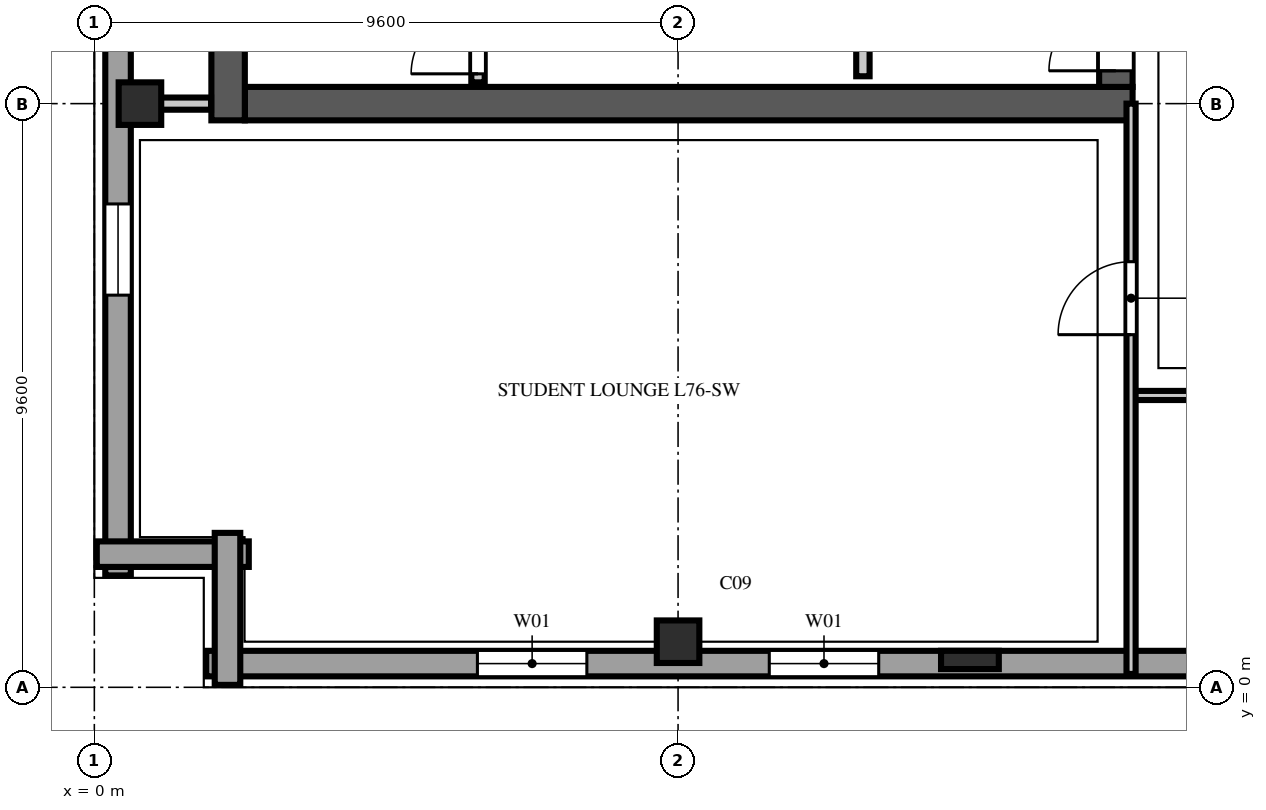
"""IFC4 building model, lengths in metres.
Left out: names, types, materials, properties, quantities, classifications, styles, units other than length and angle.
Written with IfcOpenShell. Run it as: python <this file> out.ifc"""

import sys

from ifc_helpers import new_model, si_unit, direction, frame, frame_2d, origin, origin_2d, place, context, subcontext, project, spatial, rectangle, extrude, element, fill, save


model = new_model("IFC4")
c1 = context("Model", 3, precision=1e-05, world=origin(), true_north=direction((0.0, 1.0)))
c2 = subcontext(c1, "Body", "Model", "MODEL_VIEW")
j1 = project(units=[si_unit("LENGTHUNIT", "METRE"), si_unit("PLANEANGLEUNIT", "RADIAN")], contexts=[c1])
p1 = place(None, origin())
s1 = spatial("IfcSite", under=j1, at=p1, CompositionType="ELEMENT")
p2 = place(p1, origin())
s2 = spatial("IfcBuilding", under=s1, at=p2, CompositionType="ELEMENT")
p3 = place(p2, frame((0.0, 0.0, 300.0)))
s3 = spatial("IfcBuildingStorey", under=s2, at=p3, CompositionType="ELEMENT", Elevation=300.0)
p4 = place(p3, frame((2.475, 9.6, 0.0), z_axis=(0.0, 0.0, 1.0), x_axis=(1.0, 0.0, 0.0)))
e1 = element("IfcWall", 1, at=p4, inside=s3, PredefinedType="SHEAR", context=c2, shape_type="SweptSolid", body=[
    extrude(rectangle(XDim=14.6, YDim=0.55, at=frame_2d((7.3, 0.0))), origin(), (0.0, 0.0, 1.0), 3.54),
])
p5 = place(p3, frame((2.2, 9.325, 0.0), z_axis=(0.0, 0.0, 1.0), x_axis=(0.0, 1.0, 0.0)))
e2 = element("IfcWall", 2, at=p5, inside=s3, PredefinedType="SHEAR", context=c2, shape_type="SweptSolid", body=[
    extrude(rectangle(XDim=38.95, YDim=0.55, at=frame_2d((19.475, 0.0))), origin(), (0.0, 0.0, 1.0), 3.54),
])
p6 = place(p3, frame((16.8, 9.875, 0.0), z_axis=(0.0, 0.0, 1.0), x_axis=(0.0, 1.0, 0.0)))
e3 = element("IfcWall", 3, at=p6, inside=s3, PredefinedType="SHEAR", context=c2, shape_type="SweptSolid", body=[
    extrude(rectangle(XDim=12.525, YDim=0.55, at=frame_2d((6.262, 0.0))), origin(), (0.0, 0.0, 1.0), 3.54),
])
p7 = place(p6, frame((0.265, 0.0, 0.0)))
e4 = element("IfcOpeningElement", 4, at=p7, cuts=e3, PredefinedType="OPENING", context=c2, shape_type="SweptSolid", body=[
    extrude(rectangle(XDim=1.1, YDim=2.2, at=frame_2d((0.55, 1.1))), frame((0.0, 0.287, 0.0), z_axis=(0.0, -1.0, 0.0), x_axis=(1.0, 0.0, 0.0)), (0.0, 0.0, 1.0), 0.574),
])
for number, where, z_axis, x_axis in (
    (5, (0.75, 9.6, 0.0), (0.0, 0.0, 1.0), (1.0, 0.0, 0.0)),
    (6, (9.6, 0.75, 0.0), (0.0, 0.0, 1.0), (1.0, 0.0, 0.0)),
):
    element("IfcColumn", number, at=place(p3, frame(where, z_axis=z_axis, x_axis=x_axis)), inside=s3, PredefinedType="COLUMN", context=c2, shape_type="SweptSolid", body=[
        extrude(rectangle(XDim=0.7, YDim=0.7, at=origin_2d()), origin(), (0.0, 0.0, 1.0), 3.8),
    ])
p8 = place(p3, frame((14.4, 0.45, 0.0), z_axis=(0.0, 0.0, 1.0), x_axis=(1.0, 0.0, 0.0)))
e7 = element("IfcColumn", 7, at=p8, inside=s3, PredefinedType="PILASTER", context=c2, shape_type="SweptSolid", body=[
    extrude(rectangle(XDim=0.95, YDim=0.3, at=origin_2d()), origin(), (0.0, 0.0, 1.0), 3.8),
])
p9 = place(p3, frame((1.84, 0.39, 0.0), z_axis=(0.0, 0.0, 1.0), x_axis=(1.0, 0.0, 0.0)))
e8 = element("IfcWall", 8, at=p9, inside=s3, PredefinedType="SOLIDWALL", context=c2, shape_type="SweptSolid", body=[
    extrude(rectangle(XDim=44.32, YDim=0.42, at=frame_2d((22.16, 0.0))), origin(), (0.0, 0.0, 1.0), 3.54),
])
p10 = place(p9, frame((4.46, 0.0, 0.85)))
e9 = element("IfcOpeningElement", 9, at=p10, cuts=e8, PredefinedType="OPENING", context=c2, shape_type="SweptSolid", body=[
    extrude(rectangle(XDim=1.8, YDim=1.85, at=frame_2d((0.9, 0.925))), frame((0.0, 0.222, 0.0), z_axis=(0.0, -1.0, 0.0), x_axis=(1.0, 0.0, 0.0)), (0.0, 0.0, 1.0), 0.444),
])
p11 = place(p9, frame((9.26, 0.0, 0.85)))
e10 = element("IfcOpeningElement", 10, at=p11, cuts=e8, PredefinedType="OPENING", context=c2, shape_type="SweptSolid", body=[
    extrude(rectangle(XDim=1.8, YDim=1.85, at=frame_2d((0.9, 0.925))), frame((0.0, 0.222, 0.0), z_axis=(0.0, -1.0, 0.0), x_axis=(1.0, 0.0, 0.0)), (0.0, 0.0, 1.0), 0.444),
])
p12 = place(p9, frame((18.86, 0.0, 0.85)))
e11 = element("IfcOpeningElement", 11, at=p12, cuts=e8, PredefinedType="OPENING", context=c2, shape_type="SweptSolid", body=[
    extrude(rectangle(XDim=1.8, YDim=1.85, at=frame_2d((0.9, 0.925))), frame((0.0, 0.222, 0.0), z_axis=(0.0, -1.0, 0.0), x_axis=(1.0, 0.0, 0.0)), (0.0, 0.0, 1.0), 0.444),
])
p13 = place(p9, frame((28.46, 0.0, 0.85)))
e12 = element("IfcOpeningElement", 12, at=p13, cuts=e8, PredefinedType="OPENING", context=c2, shape_type="SweptSolid", body=[
    extrude(rectangle(XDim=1.8, YDim=1.85, at=frame_2d((0.9, 0.925))), frame((0.0, 0.222, 0.0), z_axis=(0.0, -1.0, 0.0), x_axis=(1.0, 0.0, 0.0)), (0.0, 0.0, 1.0), 0.444),
])
p14 = place(p9, frame((33.26, 0.0, 0.85)))
e13 = element("IfcOpeningElement", 13, at=p14, cuts=e8, PredefinedType="OPENING", context=c2, shape_type="SweptSolid", body=[
    extrude(rectangle(XDim=1.8, YDim=1.85, at=frame_2d((0.9, 0.925))), frame((0.0, 0.222, 0.0), z_axis=(0.0, -1.0, 0.0), x_axis=(1.0, 0.0, 0.0)), (0.0, 0.0, 1.0), 0.444),
])
p15 = place(p9, frame((38.06, 0.0, 0.85)))
e14 = element("IfcOpeningElement", 14, at=p15, cuts=e8, PredefinedType="OPENING", context=c2, shape_type="SweptSolid", body=[
    extrude(rectangle(XDim=1.8, YDim=1.85, at=frame_2d((0.9, 0.925))), frame((0.0, 0.222, 0.0), z_axis=(0.0, -1.0, 0.0), x_axis=(1.0, 0.0, 0.0)), (0.0, 0.0, 1.0), 0.444),
])
p16 = place(p3, frame((0.39, 46.16, 0.0), z_axis=(0.0, 0.0, 1.0), x_axis=(0.0, -1.0, 0.0)))
e15 = element("IfcWall", 15, at=p16, inside=s3, PredefinedType="SOLIDWALL", context=c2, shape_type="SweptSolid", body=[
    extrude(rectangle(XDim=44.32, YDim=0.42, at=frame_2d((22.16, 0.0))), origin(), (0.0, 0.0, 1.0), 3.54),
])
p17 = place(p16, frame((4.885, 0.0, 0.9)))
e16 = element("IfcOpeningElement", 16, at=p17, cuts=e15, PredefinedType="OPENING", context=c2, shape_type="SweptSolid", body=[
    extrude(rectangle(XDim=0.95, YDim=1.85, at=frame_2d((0.475, 0.925))), frame((0.0, 0.222, 0.0), z_axis=(0.0, -1.0, 0.0), x_axis=(1.0, 0.0, 0.0)), (0.0, 0.0, 1.0), 0.444),
])
p18 = place(p16, frame((9.41, 0.0, 0.9)))
e17 = element("IfcOpeningElement", 17, at=p18, cuts=e15, PredefinedType="OPENING", context=c2, shape_type="SweptSolid", body=[
    extrude(rectangle(XDim=1.5, YDim=1.85, at=frame_2d((0.75, 0.925))), frame((0.0, 0.222, 0.0), z_axis=(0.0, -1.0, 0.0), x_axis=(1.0, 0.0, 0.0)), (0.0, 0.0, 1.0), 0.444),
])
p19 = place(p16, frame((14.485, 0.0, 0.9)))
e18 = element("IfcOpeningElement", 18, at=p19, cuts=e15, PredefinedType="OPENING", context=c2, shape_type="SweptSolid", body=[
    extrude(rectangle(XDim=0.95, YDim=1.85, at=frame_2d((0.475, 0.925))), frame((0.0, 0.222, 0.0), z_axis=(0.0, -1.0, 0.0), x_axis=(1.0, 0.0, 0.0)), (0.0, 0.0, 1.0), 0.444),
])
p20 = place(p16, frame((19.01, 0.0, 0.9)))
e19 = element("IfcOpeningElement", 19, at=p20, cuts=e15, PredefinedType="OPENING", context=c2, shape_type="SweptSolid", body=[
    extrude(rectangle(XDim=1.5, YDim=1.85, at=frame_2d((0.75, 0.925))), frame((0.0, 0.222, 0.0), z_axis=(0.0, -1.0, 0.0), x_axis=(1.0, 0.0, 0.0)), (0.0, 0.0, 1.0), 0.444),
])
p21 = place(p16, frame((24.085, 0.0, 0.9)))
e20 = element("IfcOpeningElement", 20, at=p21, cuts=e15, PredefinedType="OPENING", context=c2, shape_type="SweptSolid", body=[
    extrude(rectangle(XDim=0.95, YDim=1.85, at=frame_2d((0.475, 0.925))), frame((0.0, 0.222, 0.0), z_axis=(0.0, -1.0, 0.0), x_axis=(1.0, 0.0, 0.0)), (0.0, 0.0, 1.0), 0.444),
])
p22 = place(p16, frame((28.61, 0.0, 0.9)))
e21 = element("IfcOpeningElement", 21, at=p22, cuts=e15, PredefinedType="OPENING", context=c2, shape_type="SweptSolid", body=[
    extrude(rectangle(XDim=1.5, YDim=1.85, at=frame_2d((0.75, 0.925))), frame((0.0, 0.222, 0.0), z_axis=(0.0, -1.0, 0.0), x_axis=(1.0, 0.0, 0.0)), (0.0, 0.0, 1.0), 0.444),
])
p23 = place(p16, frame((33.685, 0.0, 0.9)))
e22 = element("IfcOpeningElement", 22, at=p23, cuts=e15, PredefinedType="OPENING", context=c2, shape_type="SweptSolid", body=[
    extrude(rectangle(XDim=0.95, YDim=1.85, at=frame_2d((0.475, 0.925))), frame((0.0, 0.222, 0.0), z_axis=(0.0, -1.0, 0.0), x_axis=(1.0, 0.0, 0.0)), (0.0, 0.0, 1.0), 0.444),
])
p24 = place(p16, frame((38.21, 0.0, 0.9)))
e23 = element("IfcOpeningElement", 23, at=p24, cuts=e15, PredefinedType="OPENING", context=c2, shape_type="SweptSolid", body=[
    extrude(rectangle(XDim=1.5, YDim=1.85, at=frame_2d((0.75, 0.925))), frame((0.0, 0.222, 0.0), z_axis=(0.0, -1.0, 0.0), x_axis=(1.0, 0.0, 0.0)), (0.0, 0.0, 1.0), 0.444),
])
for number, where, z_axis, x_axis in (
    (24, (0.04, 2.19, 0.0), (0.0, 0.0, 1.0), (1.0, 0.0, 0.0)),
    (25, (2.19, 2.54, 0.0), (0.0, 0.0, 1.0), (0.0, -1.0, 0.0)),
):
    element("IfcWall", number, at=place(p3, frame(where, z_axis=z_axis, x_axis=x_axis)), inside=s3, PredefinedType="SOLIDWALL", context=c2, shape_type="SweptSolid", body=[
        extrude(rectangle(XDim=2.5, YDim=0.42, at=frame_2d((1.25, 0.0))), origin(), (0.0, 0.0, 1.0), 3.54),
    ])
p25 = place(p3, frame((6.31, 9.95, 0.0), z_axis=(0.0, 0.0, 1.0), x_axis=(0.0, 1.0, 0.0)))
e26 = element("IfcWall", 26, at=p25, inside=s3, PredefinedType="SOLIDWALL", context=c2, shape_type="SweptSolid", body=[
    extrude(rectangle(XDim=7.81, YDim=0.22, at=frame_2d((3.905, 0.0))), origin(), (0.0, 0.0, 1.0), 3.54),
])
p26 = place(p25, frame((0.14, 0.0, 0.0)))
e27 = element("IfcOpeningElement", 27, at=p26, cuts=e26, PredefinedType="OPENING", context=c2, shape_type="SweptSolid", body=[
    extrude(rectangle(XDim=1.1, YDim=2.2, at=frame_2d((0.55, 1.1))), frame((0.0, 0.122, 0.0), z_axis=(0.0, -1.0, 0.0), x_axis=(1.0, 0.0, 0.0)), (0.0, 0.0, 1.0), 0.244),
])
p27 = place(p3, frame((12.64, 10.05, 0.0), z_axis=(0.0, 0.0, 1.0), x_axis=(0.0, 1.0, 0.0)))
e28 = element("IfcWall", 28, at=p27, inside=s3, PredefinedType="SOLIDWALL", context=c2, shape_type="SweptSolid", body=[
    extrude(rectangle(XDim=7.71, YDim=0.22, at=frame_2d((3.855, 0.0))), origin(), (0.0, 0.0, 1.0), 3.54),
])
p28 = place(p3, frame((0.85, 9.6, 0.0), z_axis=(0.0, 0.0, 1.0), x_axis=(1.0, 0.0, 0.0)))
e29 = element("IfcWall", 29, at=p28, inside=s3, PredefinedType="SOLIDWALL", context=c2, shape_type="SweptSolid", body=[
    extrude(rectangle(XDim=1.07, YDim=0.2, at=frame_2d((0.535, 0.0))), origin(), (0.0, 0.0, 1.0), 3.232),
])
p29 = place(p3, frame((17.05, 4.8, 0.0), z_axis=(0.0, 0.0, 1.0), x_axis=(1.0, 0.0, 0.0)))
e30 = element("IfcWall", 30, at=p29, inside=s3, PredefinedType="PARTITIONING", context=c2, shape_type="SweptSolid", body=[
    extrude(rectangle(XDim=2.15, YDim=0.15, at=frame_2d((1.075, 0.0))), origin(), (0.0, 0.0, 1.0), 3.54),
])
p30 = place(p3, frame((17.05, 0.22, 0.0), z_axis=(0.0, 0.0, 1.0), x_axis=(0.0, 1.0, 0.0)))
e31 = element("IfcWall", 31, at=p30, inside=s3, PredefinedType="PARTITIONING", context=c2, shape_type="SweptSolid", body=[
    extrude(rectangle(XDim=9.38, YDim=0.15, at=frame_2d((4.69, 0.0))), origin(), (0.0, 0.0, 1.0), 3.54),
])
p31 = place(p30, frame((5.58, 0.0, 0.0)))
e32 = element("IfcOpeningElement", 32, at=p31, cuts=e31, PredefinedType="OPENING", context=c2, shape_type="SweptSolid", body=[
    extrude(rectangle(XDim=1.2, YDim=2.2, at=frame_2d((0.6, 1.1))), frame((0.0, 0.087, 0.0), z_axis=(0.0, -1.0, 0.0), x_axis=(1.0, 0.0, 0.0)), (0.0, 0.0, 1.0), 0.174),
])
p32 = place(p10, origin())
e33 = element("IfcWindow", 33, at=p32, inside=s3, PartitioningType="DOUBLE_PANEL_VERTICAL", PredefinedType="WINDOW", context=c2, shape_type="SweptSolid", body=[
    extrude(rectangle(XDim=1.8, YDim=1.85, at=frame_2d((0.9, 0.925))), frame((0.0, 0.11, 0.0), z_axis=(0.0, -1.0, 0.0), x_axis=(1.0, 0.0, 0.0)), (0.0, 0.0, 1.0), 0.06),
])
fill(e9, e33)
p33 = place(p11, origin())
e34 = element("IfcWindow", 34, at=p33, inside=s3, PartitioningType="DOUBLE_PANEL_VERTICAL", PredefinedType="WINDOW", context=c2, shape_type="SweptSolid", body=[
    extrude(rectangle(XDim=1.8, YDim=1.85, at=frame_2d((0.9, 0.925))), frame((0.0, 0.11, 0.0), z_axis=(0.0, -1.0, 0.0), x_axis=(1.0, 0.0, 0.0)), (0.0, 0.0, 1.0), 0.06),
])
fill(e10, e34)
p34 = place(p24, origin())
e35 = element("IfcWindow", 35, at=p34, inside=s3, PartitioningType="DOUBLE_PANEL_VERTICAL", PredefinedType="WINDOW", context=c2, shape_type="SweptSolid", body=[
    extrude(rectangle(XDim=1.5, YDim=1.85, at=frame_2d((0.75, 0.925))), frame((0.0, 0.11, 0.0), z_axis=(0.0, -1.0, 0.0), x_axis=(1.0, 0.0, 0.0)), (0.0, 0.0, 1.0), 0.06),
])
fill(e23, e35)
p35 = place(p26, origin())
e36 = element("IfcDoor", 36, at=p35, inside=s3, OperationType="SINGLE_SWING_LEFT", PredefinedType="DOOR", context=c2, shape_type="SweptSolid", body=[
    extrude(rectangle(XDim=1.1, YDim=2.2, at=frame_2d((0.55, 1.1))), frame((0.0, 0.025, 0.0), z_axis=(0.0, -1.0, 0.0), x_axis=(1.0, 0.0, 0.0)), (0.0, 0.0, 1.0), 0.05),
])
fill(e27, e36)
p36 = place(p7, origin())
e37 = element("IfcDoor", 37, at=p36, inside=s3, OperationType="SINGLE_SWING_LEFT", PredefinedType="DOOR", context=c2, shape_type="SweptSolid", body=[
    extrude(rectangle(XDim=1.1, YDim=2.2, at=frame_2d((0.55, 1.1))), frame((0.0, 0.025, 0.0), z_axis=(0.0, -1.0, 0.0), x_axis=(1.0, 0.0, 0.0)), (0.0, 0.0, 1.0), 0.05),
])
fill(e4, e37)
p37 = place(p31, origin())
e38 = element("IfcDoor", 38, at=p37, inside=s3, OperationType="SINGLE_SWING_LEFT", PredefinedType="DOOR", context=c2, shape_type="SweptSolid", body=[
    extrude(rectangle(XDim=1.2, YDim=2.2, at=frame_2d((0.6, 1.1))), frame((0.0, 0.025, 0.0), z_axis=(0.0, -1.0, 0.0), x_axis=(1.0, 0.0, 0.0)), (0.0, 0.0, 1.0), 0.05),
])
fill(e32, e38)
save(model, sys.argv[1])
